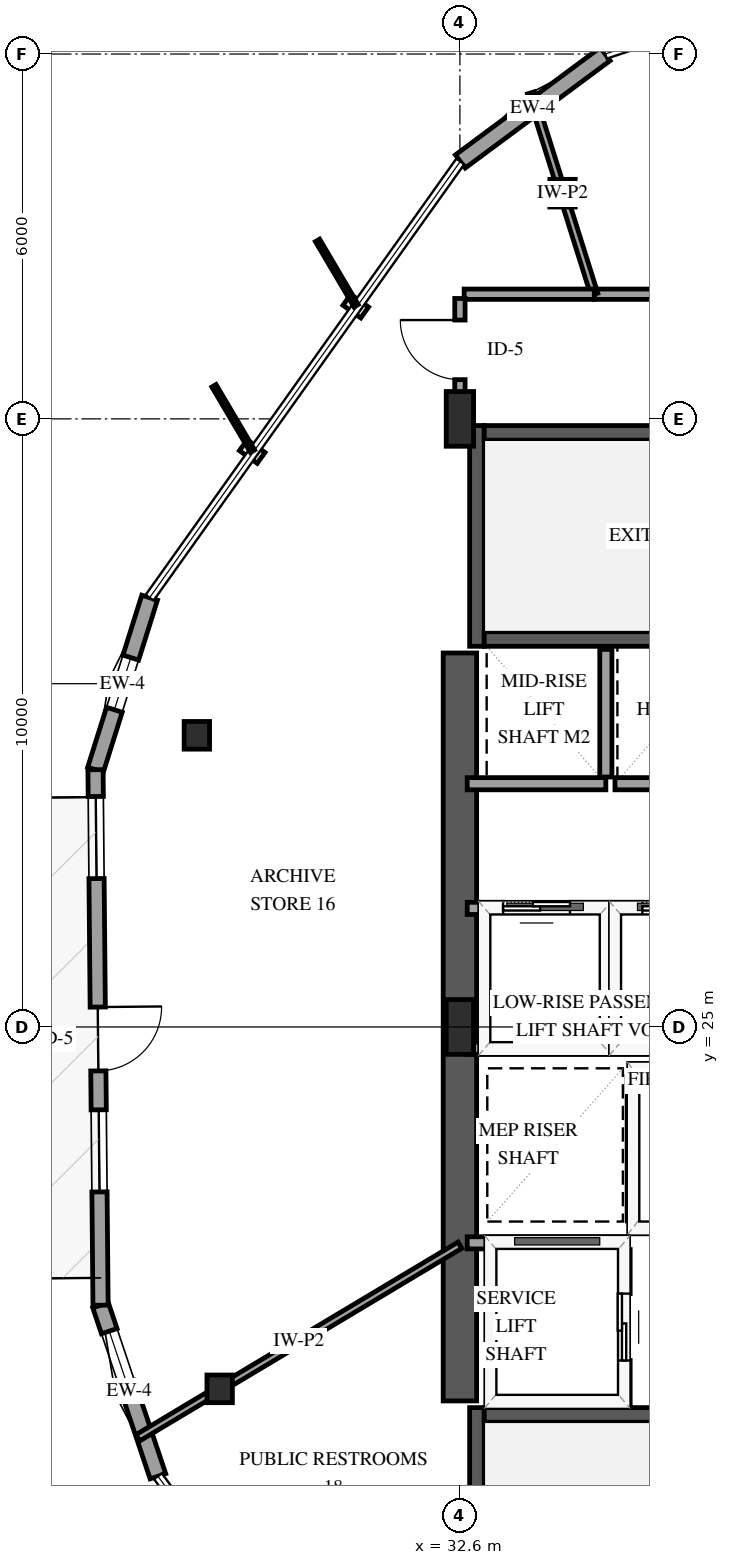
"""IFC4 building model, lengths in metres.
Left out: names, types, materials, properties, quantities, classifications, styles, units other than length and angle.
Written with IfcOpenShell. Run it as: python <this file> out.ifc"""

import sys

from ifc_helpers import new_model, si_unit, direction, frame, frame_2d, origin, origin_2d, place, context, subcontext, project, spatial, rectangle, i_section, extrude, element, fill, save


model = new_model("IFC4")
c1 = context("Model", 3, precision=1e-05, world=origin(), true_north=direction((0.0, 1.0)))
c2 = subcontext(c1, "Body", "Model", "MODEL_VIEW")
j1 = project(units=[si_unit("LENGTHUNIT", "METRE"), si_unit("PLANEANGLEUNIT", "RADIAN")], contexts=[c1])
p1 = place(None, origin())
s1 = spatial("IfcSite", under=j1, at=p1, CompositionType="ELEMENT")
p2 = place(p1, origin())
s2 = spatial("IfcBuilding", under=s1, at=p2, CompositionType="ELEMENT")
p3 = place(p2, frame((0.0, 0.0, 103.0)))
s3 = spatial("IfcBuildingStorey", under=s2, at=p3, CompositionType="ELEMENT", Elevation=103.0)
p4 = place(p3, frame((32.88, 15.11, 0.0), z_axis=(0.0, 0.0, 1.0), x_axis=(0.0, 1.0, 0.0)))
e1 = element("IfcWall", 1, at=p4, inside=s3, PredefinedType="SHEAR", context=c2, shape_type="SweptSolid", body=[
    extrude(rectangle(XDim=3.63, YDim=0.24, at=frame_2d((1.815, 0.0))), origin(), (0.0, 0.0, 1.0), 3.9),
])
p5 = place(p3, frame((33.0, 18.62, 0.0), z_axis=(0.0, 0.0, 1.0), x_axis=(1.0, 0.0, 0.0)))
e2 = element("IfcWall", 2, at=p5, inside=s3, PredefinedType="SHEAR", context=c2, shape_type="SweptSolid", body=[
    extrude(rectangle(XDim=8.0, YDim=0.24, at=frame_2d((4.0, 0.0))), origin(), (0.0, 0.0, 1.0), 3.9),
])
p6 = place(p3, frame((32.88, 31.26, 0.0), z_axis=(0.0, 0.0, 1.0), x_axis=(0.0, 1.0, 0.0)))
e3 = element("IfcWall", 3, at=p6, inside=s3, PredefinedType="SHEAR", context=c2, shape_type="SweptSolid", body=[
    extrude(rectangle(XDim=3.63, YDim=0.24, at=frame_2d((1.815, 0.0))), origin(), (0.0, 0.0, 1.0), 3.9),
])
for number, where, z_axis, x_axis in (
    (4, (33.0, 31.38, 0.0), (0.0, 0.0, 1.0), (1.0, 0.0, 0.0)),
    (5, (33.0, 34.77, 0.0), (0.0, 0.0, 1.0), (1.0, 0.0, 0.0)),
):
    element("IfcWall", number, at=place(p3, frame(where, z_axis=z_axis, x_axis=x_axis)), inside=s3, PredefinedType="SHEAR", context=c2, shape_type="SweptSolid", body=[
        extrude(rectangle(XDim=8.0, YDim=0.24, at=frame_2d((4.0, 0.0))), origin(), (0.0, 0.0, 1.0), 3.9),
    ])
p7 = place(p3, frame((32.6, 18.85, 0.0), z_axis=(0.0, 0.0, 1.0), x_axis=(0.0, 1.0, 0.0)))
e6 = element("IfcWall", 6, at=p7, inside=s3, PredefinedType="SHEAR", context=c2, shape_type="SweptSolid", body=[
    extrude(rectangle(XDim=12.3, YDim=0.55, at=frame_2d((6.15, 0.0))), origin(), (0.0, 0.0, 1.0), 3.9),
])
for number, where, z_axis, x_axis in (
    (7, (32.6, 25.0, 0.0), (0.0, 0.0, 1.0), (1.0, 0.0, 0.0)),
    (8, (32.6, 35.0, 0.0), (0.0, 0.0, 1.0), (1.0, 0.0, 0.0)),
):
    element("IfcColumn", number, at=place(p3, frame(where, z_axis=z_axis, x_axis=x_axis)), inside=s3, PredefinedType="PILASTER", context=c2, shape_type="SweptSolid", body=[
        extrude(rectangle(XDim=0.45, YDim=0.9, at=origin_2d()), origin(), (0.0, 0.0, 1.0), 3.9),
    ])
for number, where, z_axis, x_axis in (
    (9, (34.288, 38.711, 0.0), (0.0, 0.0, 1.0), (1.0, 0.0, 0.0)),
    (10, (28.274, 29.796, 0.0), (0.0, 0.0, 1.0), (1.0, 0.0, 0.0)),
    (11, (28.649, 19.049, 0.0), (0.0, 0.0, 1.0), (1.0, 0.0, 0.0)),
):
    element("IfcColumn", number, at=place(p3, frame(where, z_axis=z_axis, x_axis=x_axis)), inside=s3, PredefinedType="COLUMN", context=c2, shape_type="SweptSolid", body=[
        extrude(i_section(OverallWidth=0.418, OverallDepth=0.455, WebThickness=0.042, FlangeThickness=0.068, FilletRadius=0.038, at=origin_2d()), origin(), (0.0, 0.0, 1.0), 3.9),
    ])
p8 = place(p3, frame((34.99, 41.0, 0.0), z_axis=(0.0, 0.0, 1.0), x_axis=(-0.803433261612, -0.595394822059, 0.0)))
e12 = element("IfcWall", 12, at=p8, inside=s3, PredefinedType="SOLIDWALL", context=c2, shape_type="SweptSolid", body=[
    extrude(rectangle(XDim=2.967, YDim=0.27, at=frame_2d((1.483, 0.0))), origin(), (0.0, 0.0, 1.0), 2.979),
])
p9 = place(p3, frame((27.498, 32.06, 0.0), z_axis=(0.0, 0.0, 1.0), x_axis=(-0.300036293242, -0.953927786962, 0.0)))
e13 = element("IfcWall", 13, at=p9, inside=s3, PredefinedType="SOLIDWALL", context=c2, shape_type="SweptSolid", body=[
    extrude(rectangle(XDim=2.967, YDim=0.27, at=frame_2d((1.483, 0.0))), origin(), (0.0, 0.0, 1.0), 2.979),
])
p10 = place(p9, frame((1.033, 0.0, 0.75)))
e14 = element("IfcOpeningElement", 14, at=p10, cuts=e13, PredefinedType="OPENING", context=c2, shape_type="SweptSolid", body=[
    extrude(rectangle(XDim=0.9, YDim=1.5, at=frame_2d((0.45, 0.75))), frame((0.0, 0.145, 0.0), z_axis=(0.0, -1.0, 0.0), x_axis=(1.0, 0.0, 0.0)), (0.0, 0.0, 1.0), 0.29),
])
p11 = place(p3, frame((26.69, 20.424, 0.0), z_axis=(0.0, 0.0, 1.0), x_axis=(0.317980066672, -0.948097398583, 0.0)))
e15 = element("IfcWall", 15, at=p11, inside=s3, PredefinedType="SOLIDWALL", context=c2, shape_type="SweptSolid", body=[
    extrude(rectangle(XDim=2.967, YDim=0.27, at=frame_2d((1.483, 0.0))), origin(), (0.0, 0.0, 1.0), 2.979),
])
p12 = place(p11, frame((0.45, 0.0, 0.75)))
e16 = element("IfcOpeningElement", 16, at=p12, cuts=e15, PredefinedType="OPENING", context=c2, shape_type="SweptSolid", body=[
    extrude(rectangle(XDim=0.9, YDim=1.5, at=frame_2d((0.45, 0.75))), frame((0.0, 0.145, 0.0), z_axis=(0.0, -1.0, 0.0), x_axis=(1.0, 0.0, 0.0)), (0.0, 0.0, 1.0), 0.29),
])
p13 = place(p3, frame((26.607, 29.23, 0.0), z_axis=(0.0, 0.0, 1.0), x_axis=(0.009425958451, -0.999955574667, 0.0)))
e17 = element("IfcWall", 17, at=p13, inside=s3, PredefinedType="SOLIDWALL", context=c2, shape_type="SweptSolid", body=[
    extrude(rectangle(XDim=8.806, YDim=0.25, at=frame_2d((4.403, 0.0))), origin(), (0.0, 0.0, 1.0), 2.979),
])
p14 = place(p13, frame((3.903, 0.0, 0.0)))
e18 = element("IfcOpeningElement", 18, at=p14, cuts=e17, PredefinedType="OPENING", context=c2, shape_type="SweptSolid", body=[
    extrude(rectangle(XDim=1.05, YDim=2.15, at=frame_2d((0.525, 1.075))), frame((0.0, 0.135, 0.0), z_axis=(0.0, -1.0, 0.0), x_axis=(1.0, 0.0, 0.0)), (0.0, 0.0, 1.0), 0.27),
])
p15 = place(p13, frame((0.44, 0.0, 0.72)))
e19 = element("IfcOpeningElement", 19, at=p15, cuts=e17, PredefinedType="OPENING", context=c2, shape_type="SweptSolid", body=[
    extrude(rectangle(XDim=1.35, YDim=1.65, at=frame_2d((0.675, 0.825))), frame((0.0, 0.135, 0.0), z_axis=(0.0, -1.0, 0.0), x_axis=(1.0, 0.0, 0.0)), (0.0, 0.0, 1.0), 0.27),
])
p16 = place(p13, frame((5.593, 0.0, 0.72)))
e20 = element("IfcOpeningElement", 20, at=p16, cuts=e17, PredefinedType="OPENING", context=c2, shape_type="SweptSolid", body=[
    extrude(rectangle(XDim=1.35, YDim=1.65, at=frame_2d((0.675, 0.825))), frame((0.0, 0.135, 0.0), z_axis=(0.0, -1.0, 0.0), x_axis=(1.0, 0.0, 0.0)), (0.0, 0.0, 1.0), 0.27),
])
p17 = place(p3, frame((35.45, 21.7, 0.0), z_axis=(0.0, 0.0, 1.0), x_axis=(1.0, 0.0, 0.0)))
e21 = element("IfcWall", 21, at=p17, inside=s3, PredefinedType="SOLIDWALL", context=c2, shape_type="SweptSolid", body=[
    extrude(rectangle(XDim=2.0, YDim=0.2, at=frame_2d((1.0, 0.0))), origin(), (0.0, 0.0, 1.0), 3.6),
])
p18 = place(p17, frame((0.45, 0.0, 0.0)))
e22 = element("IfcOpeningElement", 22, at=p18, cuts=e21, PredefinedType="OPENING", context=c2, shape_type="SweptSolid", body=[
    extrude(rectangle(XDim=1.1, YDim=2.15, at=frame_2d((0.55, 1.075))), frame((0.0, 0.11, 0.0), z_axis=(0.0, -1.0, 0.0), x_axis=(1.0, 0.0, 0.0)), (0.0, 0.0, 1.0), 0.22),
])
p19 = place(p3, frame((35.45, 24.3, 0.0), z_axis=(0.0, 0.0, 1.0), x_axis=(1.0, 0.0, 0.0)))
e23 = element("IfcWall", 23, at=p19, inside=s3, PredefinedType="SOLIDWALL", context=c2, shape_type="SweptSolid", body=[
    extrude(rectangle(XDim=2.0, YDim=0.2, at=frame_2d((1.0, 0.0))), origin(), (0.0, 0.0, 1.0), 3.6),
])
p20 = place(p3, frame((35.45, 21.81, 0.0), z_axis=(0.0, 0.0, 1.0), x_axis=(0.0, 1.0, 0.0)))
e24 = element("IfcWall", 24, at=p20, inside=s3, PredefinedType="SOLIDWALL", context=c2, shape_type="SweptSolid", body=[
    extrude(rectangle(XDim=2.38, YDim=0.2, at=frame_2d((1.19, 0.0))), origin(), (0.0, 0.0, 1.0), 3.6),
])
p21 = place(p3, frame((32.72, 21.45, 0.0), z_axis=(0.0, 0.0, 1.0), x_axis=(1.0, 0.0, 0.0)))
e25 = element("IfcWall", 25, at=p21, inside=s3, PredefinedType="SOLIDWALL", context=c2, shape_type="SweptSolid", body=[
    extrude(rectangle(XDim=2.58, YDim=0.2, at=frame_2d((1.29, 0.0))), origin(), (0.0, 0.0, 1.0), 3.6),
])
p22 = place(p3, frame((35.3, 18.79, 0.0), z_axis=(0.0, 0.0, 1.0), x_axis=(0.0, 1.0, 0.0)))
e26 = element("IfcWall", 26, at=p22, inside=s3, PredefinedType="SOLIDWALL", context=c2, shape_type="SweptSolid", body=[
    extrude(rectangle(XDim=2.55, YDim=0.2, at=frame_2d((1.275, 0.0))), origin(), (0.0, 0.0, 1.0), 3.6),
])
p23 = place(p22, frame((0.725, 0.0, 0.0)))
e27 = element("IfcOpeningElement", 27, at=p23, cuts=e26, PredefinedType="OPENING", context=c2, shape_type="SweptSolid", body=[
    extrude(rectangle(XDim=1.1, YDim=2.15, at=frame_2d((0.55, 1.075))), frame((0.0, 0.11, 0.0), z_axis=(0.0, -1.0, 0.0), x_axis=(1.0, 0.0, 0.0)), (0.0, 0.0, 1.0), 0.22),
])
p24 = place(p3, frame((32.72, 24.65, 0.0), z_axis=(0.0, 0.0, 1.0), x_axis=(1.0, 0.0, 0.0)))
e28 = element("IfcWall", 28, at=p24, inside=s3, PredefinedType="SOLIDWALL", context=c2, shape_type="SweptSolid", body=[
    extrude(rectangle(XDim=2.28, YDim=0.2, at=frame_2d((1.14, 0.0))), origin(), (0.0, 0.0, 1.0), 3.6),
])
p25 = place(p3, frame((32.72, 26.95, 0.0), z_axis=(0.0, 0.0, 1.0), x_axis=(1.0, 0.0, 0.0)))
e29 = element("IfcWall", 29, at=p25, inside=s3, PredefinedType="SOLIDWALL", context=c2, shape_type="SweptSolid", body=[
    extrude(rectangle(XDim=2.28, YDim=0.2, at=frame_2d((1.14, 0.0))), origin(), (0.0, 0.0, 1.0), 3.6),
])
p26 = place(p25, frame((0.59, 0.0, 0.0)))
e30 = element("IfcOpeningElement", 30, at=p26, cuts=e29, PredefinedType="OPENING", context=c2, shape_type="SweptSolid", body=[
    extrude(rectangle(XDim=1.1, YDim=2.15, at=frame_2d((0.55, 1.075))), frame((0.0, 0.11, 0.0), z_axis=(0.0, -1.0, 0.0), x_axis=(1.0, 0.0, 0.0)), (0.0, 0.0, 1.0), 0.22),
])
p27 = place(p3, frame((35.0, 24.76, 0.0), z_axis=(0.0, 0.0, 1.0), x_axis=(0.0, 1.0, 0.0)))
e31 = element("IfcWall", 31, at=p27, inside=s3, PredefinedType="SOLIDWALL", context=c2, shape_type="SweptSolid", body=[
    extrude(rectangle(XDim=2.08, YDim=0.2, at=frame_2d((1.04, 0.0))), origin(), (0.0, 0.0, 1.0), 3.6),
])
p28 = place(p3, frame((35.15, 24.65, 0.0), z_axis=(0.0, 0.0, 1.0), x_axis=(1.0, 0.0, 0.0)))
e32 = element("IfcWall", 32, at=p28, inside=s3, PredefinedType="SOLIDWALL", context=c2, shape_type="SweptSolid", body=[
    extrude(rectangle(XDim=2.0, YDim=0.2, at=frame_2d((1.0, 0.0))), origin(), (0.0, 0.0, 1.0), 3.6),
])
p29 = place(p3, frame((35.15, 26.95, 0.0), z_axis=(0.0, 0.0, 1.0), x_axis=(1.0, 0.0, 0.0)))
e33 = element("IfcWall", 33, at=p29, inside=s3, PredefinedType="SOLIDWALL", context=c2, shape_type="SweptSolid", body=[
    extrude(rectangle(XDim=2.0, YDim=0.2, at=frame_2d((1.0, 0.0))), origin(), (0.0, 0.0, 1.0), 3.6),
])
p30 = place(p29, frame((0.45, 0.0, 0.0)))
e34 = element("IfcOpeningElement", 34, at=p30, cuts=e33, PredefinedType="OPENING", context=c2, shape_type="SweptSolid", body=[
    extrude(rectangle(XDim=1.1, YDim=2.15, at=frame_2d((0.55, 1.075))), frame((0.0, 0.11, 0.0), z_axis=(0.0, -1.0, 0.0), x_axis=(1.0, 0.0, 0.0)), (0.0, 0.0, 1.0), 0.22),
])
p31 = place(p3, frame((32.72, 29.0, 0.0), z_axis=(0.0, 0.0, 1.0), x_axis=(1.0, 0.0, 0.0)))
e35 = element("IfcWall", 35, at=p31, inside=s3, PredefinedType="SOLIDWALL", context=c2, shape_type="SweptSolid", body=[
    extrude(rectangle(XDim=2.28, YDim=0.2, at=frame_2d((1.14, 0.0))), origin(), (0.0, 0.0, 1.0), 3.6),
])
p32 = place(p3, frame((35.0, 29.11, 0.0), z_axis=(0.0, 0.0, 1.0), x_axis=(0.0, 1.0, 0.0)))
e36 = element("IfcWall", 36, at=p32, inside=s3, PredefinedType="SOLIDWALL", context=c2, shape_type="SweptSolid", body=[
    extrude(rectangle(XDim=2.1, YDim=0.2, at=frame_2d((1.05, 0.0))), origin(), (0.0, 0.0, 1.0), 3.6),
])
p33 = place(p3, frame((35.15, 29.0, 0.0), z_axis=(0.0, 0.0, 1.0), x_axis=(1.0, 0.0, 0.0)))
e37 = element("IfcWall", 37, at=p33, inside=s3, PredefinedType="SOLIDWALL", context=c2, shape_type="SweptSolid", body=[
    extrude(rectangle(XDim=2.0, YDim=0.2, at=frame_2d((1.0, 0.0))), origin(), (0.0, 0.0, 1.0), 3.6),
])
p34 = place(p3, frame((34.81, 37.05, 0.0), z_axis=(0.0, 0.0, 1.0), x_axis=(1.0, 0.0, 0.0)))
e38 = element("IfcWall", 38, at=p34, inside=s3, PredefinedType="PARTITIONING", context=c2, shape_type="SweptSolid", body=[
    extrude(rectangle(XDim=7.804, YDim=0.17, at=frame_2d((3.902, 0.0))), origin(), (0.0, 0.0, 1.0), 3.6),
])
p35 = place(p34, frame((3.427, 0.0, 0.0)))
e39 = element("IfcOpeningElement", 39, at=p35, cuts=e38, PredefinedType="OPENING", context=c2, shape_type="SweptSolid", body=[
    extrude(rectangle(XDim=0.98, YDim=2.15, at=frame_2d((0.49, 1.075))), frame((0.0, 0.095, 0.0), z_axis=(0.0, -1.0, 0.0), x_axis=(1.0, 0.0, 0.0)), (0.0, 0.0, 1.0), 0.19),
])
p36 = place(p3, frame((32.6, 21.411, 0.0), z_axis=(0.0, 0.0, 1.0), x_axis=(-0.85825649037, -0.513221001848, 0.0)))
e40 = element("IfcWall", 40, at=p36, inside=s3, PredefinedType="PARTITIONING", context=c2, shape_type="SweptSolid", body=[
    extrude(rectangle(XDim=6.171, YDim=0.12, at=frame_2d((3.085, 0.0))), origin(), (0.0, 0.0, 1.0), 3.6),
])
p37 = place(p3, frame((34.81, 37.05, 0.0), z_axis=(0.0, 0.0, 1.0), x_axis=(-0.30010816063, 0.953905179734, 0.0)))
e41 = element("IfcWall", 41, at=p37, inside=s3, PredefinedType="PARTITIONING", context=c2, shape_type="SweptSolid", body=[
    extrude(rectangle(XDim=3.472, YDim=0.12, at=frame_2d((1.736, 0.0))), origin(), (0.0, 0.0, 1.0), 2.895),
])
p38 = place(p3, frame((32.67, 37.05, 0.0), z_axis=(0.0, 0.0, 1.0), x_axis=(1.0, 0.0, 0.0)))
e42 = element("IfcWall", 42, at=p38, inside=s3, PredefinedType="PARTITIONING", context=c2, shape_type="SweptSolid", body=[
    extrude(rectangle(XDim=2.14, YDim=0.17, at=frame_2d((1.07, 0.0))), origin(), (0.0, 0.0, 1.0), 3.6),
])
p39 = place(p3, frame((32.6, 35.07, 0.0), z_axis=(0.0, 0.0, 1.0), x_axis=(0.0, 1.0, 0.0)))
e43 = element("IfcWall", 43, at=p39, inside=s3, PredefinedType="PARTITIONING", context=c2, shape_type="SweptSolid", body=[
    extrude(rectangle(XDim=1.91, YDim=0.17, at=frame_2d((0.955, 0.0))), origin(), (0.0, 0.0, 1.0), 3.6),
])
p40 = place(p39, frame((0.575, 0.0, 0.0)))
e44 = element("IfcOpeningElement", 44, at=p40, cuts=e43, PredefinedType="OPENING", context=c2, shape_type="SweptSolid", body=[
    extrude(rectangle(XDim=0.98, YDim=2.15, at=frame_2d((0.49, 1.075))), frame((0.0, 0.095, 0.0), z_axis=(0.0, -1.0, 0.0), x_axis=(1.0, 0.0, 0.0)), (0.0, 0.0, 1.0), 0.19),
])
p41 = place(p10, origin())
e45 = element("IfcWindow", 45, at=p41, inside=s3, PartitioningType="SINGLE_PANEL", PredefinedType="WINDOW", context=c2, shape_type="SweptSolid", body=[
    extrude(rectangle(XDim=0.9, YDim=1.5, at=frame_2d((0.45, 0.75))), frame((0.0, 0.03, 0.0), z_axis=(0.0, -1.0, 0.0), x_axis=(1.0, 0.0, 0.0)), (0.0, 0.0, 1.0), 0.06),
])
fill(e14, e45)
p42 = place(p12, origin())
e46 = element("IfcWindow", 46, at=p42, inside=s3, PartitioningType="SINGLE_PANEL", PredefinedType="WINDOW", context=c2, shape_type="SweptSolid", body=[
    extrude(rectangle(XDim=0.9, YDim=1.5, at=frame_2d((0.45, 0.75))), frame((0.0, 0.03, 0.0), z_axis=(0.0, -1.0, 0.0), x_axis=(1.0, 0.0, 0.0)), (0.0, 0.0, 1.0), 0.06),
])
fill(e16, e46)
p43 = place(p14, origin())
e47 = element("IfcDoor", 47, at=p43, inside=s3, OperationType="SINGLE_SWING_LEFT", PredefinedType="DOOR", context=c2, shape_type="SweptSolid", body=[
    extrude(rectangle(XDim=1.05, YDim=2.15, at=frame_2d((0.525, 1.075))), frame((0.0, 0.025, 0.0), z_axis=(0.0, -1.0, 0.0), x_axis=(1.0, 0.0, 0.0)), (0.0, 0.0, 1.0), 0.05),
])
fill(e18, e47)
p44 = place(p15, origin())
e48 = element("IfcWindow", 48, at=p44, inside=s3, PartitioningType="SINGLE_PANEL", PredefinedType="WINDOW", context=c2, shape_type="SweptSolid", body=[
    extrude(rectangle(XDim=1.35, YDim=1.65, at=frame_2d((0.675, 0.825))), frame((0.0, 0.03, 0.0), z_axis=(0.0, -1.0, 0.0), x_axis=(1.0, 0.0, 0.0)), (0.0, 0.0, 1.0), 0.06),
])
fill(e19, e48)
p45 = place(p16, origin())
e49 = element("IfcWindow", 49, at=p45, inside=s3, PartitioningType="SINGLE_PANEL", PredefinedType="WINDOW", context=c2, shape_type="SweptSolid", body=[
    extrude(rectangle(XDim=1.35, YDim=1.65, at=frame_2d((0.675, 0.825))), frame((0.0, 0.03, 0.0), z_axis=(0.0, -1.0, 0.0), x_axis=(1.0, 0.0, 0.0)), (0.0, 0.0, 1.0), 0.06),
])
fill(e20, e49)
p46 = place(p23, origin())
e50 = element("IfcDoor", 50, at=p46, inside=s3, OperationType="SLIDING_TO_LEFT", PredefinedType="DOOR", context=c2, shape_type="SweptSolid", body=[
    extrude(rectangle(XDim=1.1, YDim=2.15, at=frame_2d((0.55, 1.075))), frame((0.0, 0.025, 0.0), z_axis=(0.0, -1.0, 0.0), x_axis=(1.0, 0.0, 0.0)), (0.0, 0.0, 1.0), 0.05),
])
fill(e27, e50)
p47 = place(p26, origin())
e51 = element("IfcDoor", 51, at=p47, inside=s3, OperationType="SLIDING_TO_LEFT", PredefinedType="DOOR", context=c2, shape_type="SweptSolid", body=[
    extrude(rectangle(XDim=1.1, YDim=2.15, at=frame_2d((0.55, 1.075))), frame((0.0, 0.025, 0.0), z_axis=(0.0, -1.0, 0.0), x_axis=(1.0, 0.0, 0.0)), (0.0, 0.0, 1.0), 0.05),
])
fill(e30, e51)
p48 = place(p30, origin())
e52 = element("IfcDoor", 52, at=p48, inside=s3, OperationType="SLIDING_TO_LEFT", PredefinedType="DOOR", context=c2, shape_type="SweptSolid", body=[
    extrude(rectangle(XDim=1.1, YDim=2.15, at=frame_2d((0.55, 1.075))), frame((0.0, 0.025, 0.0), z_axis=(0.0, -1.0, 0.0), x_axis=(1.0, 0.0, 0.0)), (0.0, 0.0, 1.0), 0.05),
])
fill(e34, e52)
p49 = place(p40, origin())
e53 = element("IfcDoor", 53, at=p49, inside=s3, OperationType="SINGLE_SWING_RIGHT", PredefinedType="DOOR", context=c2, shape_type="SweptSolid", body=[
    extrude(rectangle(XDim=0.98, YDim=2.15, at=frame_2d((0.49, 1.075))), frame((0.0, 0.025, 0.0), z_axis=(0.0, -1.0, 0.0), x_axis=(1.0, 0.0, 0.0)), (0.0, 0.0, 1.0), 0.05),
])
fill(e44, e53)
save(model, sys.argv[1])
